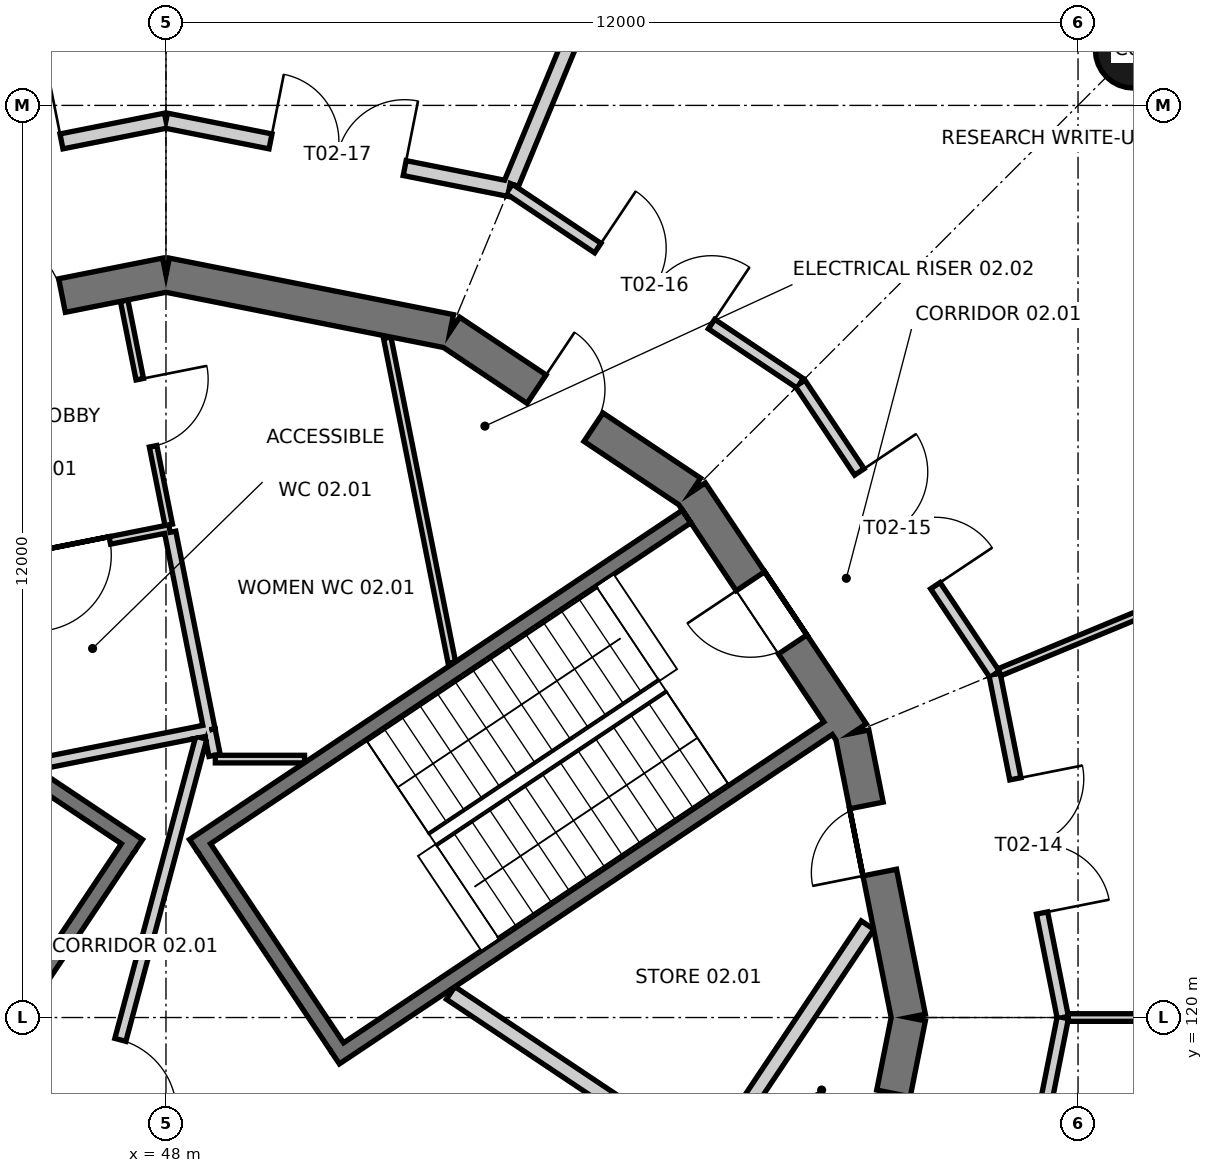
"""IFC4 building model, lengths in metres.
Left out: names, types, materials, properties, quantities, classifications, styles, units other than length and angle.
Written with IfcOpenShell. Run it as: python <this file> out.ifc"""

import sys

from ifc_helpers import new_model, si_unit, direction, frame, frame_2d, origin, origin_2d, place, context, subcontext, project, spatial, polyline, rectangle, circle, outline, extrude, element, fill, save


model = new_model("IFC4")
c1 = context("Model", 3, precision=1e-05, world=origin(), true_north=direction((0.0, 1.0)))
c2 = subcontext(c1, "Body", "Model", "MODEL_VIEW")
j1 = project(units=[si_unit("LENGTHUNIT", "METRE"), si_unit("PLANEANGLEUNIT", "RADIAN")], contexts=[c1])
p1 = place(None, origin())
s1 = spatial("IfcSite", under=j1, at=p1, CompositionType="ELEMENT")
p2 = place(p1, origin())
s2 = spatial("IfcBuilding", under=s1, at=p2, CompositionType="ELEMENT")
p3 = place(p2, frame((0.0, 0.0, 10.8)))
s3 = spatial("IfcBuildingStorey", under=s2, at=p3, CompositionType="ELEMENT", Elevation=10.8)
p4 = place(p3, frame((57.771, 120.0, 0.0), z_axis=(0.0, 0.0, 1.0), x_axis=(-0.195069197673, 0.98078948206, 0.0)))
e1 = element("IfcWall", 1, at=p4, inside=s3, PredefinedType="SHEAR", context=c2, shape_type="SweptSolid", body=[
    extrude(outline(polyline([(-0.045, -0.225), (3.857, -0.225), (3.768, 0.225), (0.045, 0.225), (-0.045, -0.225)])), origin(), (0.0, 0.0, 1.0), 4.8),
])
p5 = place(p4, frame((1.945, 0.0, 0.0)))
e2 = element("IfcOpeningElement", 2, at=p5, cuts=e1, PredefinedType="OPENING", context=c2, shape_type="SweptSolid", body=[
    extrude(rectangle(XDim=0.9, YDim=2.1, at=frame_2d((0.45, 1.05))), frame((0.0, 0.235, 0.0), z_axis=(0.0, -1.0, 0.0), x_axis=(1.0, 0.0, 0.0)), (0.0, 0.0, 1.0), 0.47),
])
p6 = place(p3, frame((57.027, 123.739, 0.0), z_axis=(0.0, 0.0, 1.0), x_axis=(-0.555542277102, 0.83148829117, 0.0)))
e3 = element("IfcWall", 3, at=p6, inside=s3, PredefinedType="SHEAR", context=c2, shape_type="SweptSolid", body=[
    extrude(outline(polyline([(-0.045, -0.225), (3.857, -0.225), (3.768, 0.225), (0.045, 0.225), (-0.045, -0.225)])), origin(), (0.0, 0.0, 1.0), 4.8),
])
p7 = place(p6, frame((1.406, 0.0, 0.0)))
e4 = element("IfcOpeningElement", 4, at=p7, cuts=e3, PredefinedType="OPENING", context=c2, shape_type="SweptSolid", body=[
    extrude(rectangle(XDim=1.0, YDim=2.1, at=frame_2d((0.5, 1.05))), frame((0.0, 0.235, 0.0), z_axis=(0.0, -1.0, 0.0), x_axis=(1.0, 0.0, 0.0)), (0.0, 0.0, 1.0), 0.47),
])
p8 = place(p3, frame((54.909, 126.909, 0.0), z_axis=(0.0, 0.0, 1.0), x_axis=(-0.83148829117, 0.555542277102, 0.0)))
e5 = element("IfcWall", 5, at=p8, inside=s3, PredefinedType="SHEAR", context=c2, shape_type="SweptSolid", body=[
    extrude(outline(polyline([(-0.045, -0.225), (3.857, -0.225), (3.768, 0.225), (0.045, 0.225), (-0.045, -0.225)])), origin(), (0.0, 0.0, 1.0), 4.8),
])
p9 = place(p8, frame((1.545, 0.0, 0.0)))
e6 = element("IfcOpeningElement", 6, at=p9, cuts=e5, PredefinedType="OPENING", context=c2, shape_type="SweptSolid", body=[
    extrude(rectangle(XDim=0.9, YDim=2.1, at=frame_2d((0.45, 1.05))), frame((0.0, 0.235, 0.0), z_axis=(0.0, -1.0, 0.0), x_axis=(1.0, 0.0, 0.0)), (0.0, 0.0, 1.0), 0.47),
])
p10 = place(p3, frame((51.739, 129.027, 0.0), z_axis=(0.0, 0.0, 1.0), x_axis=(-0.98078948206, 0.195069197673, 0.0)))
e7 = element("IfcWall", 7, at=p10, inside=s3, PredefinedType="SHEAR", context=c2, shape_type="SweptSolid", body=[
    extrude(outline(polyline([(-0.045, -0.225), (3.857, -0.225), (3.768, 0.225), (0.045, 0.225), (-0.045, -0.225)])), origin(), (0.0, 0.0, 1.0), 4.8),
])
p11 = place(p3, frame((48.0, 129.771, 0.0), z_axis=(0.0, 0.0, 1.0), x_axis=(-0.98078948206, -0.195069197673, 0.0)))
e8 = element("IfcWall", 8, at=p11, inside=s3, PredefinedType="SHEAR", context=c2, shape_type="SweptSolid", body=[
    extrude(outline(polyline([(-0.045, -0.225), (3.857, -0.225), (3.768, 0.225), (0.045, 0.225), (-0.045, -0.225)])), origin(), (0.0, 0.0, 1.0), 4.8),
])
p12 = place(p11, frame((1.395, 0.0, 0.0)))
e9 = element("IfcOpeningElement", 9, at=p12, cuts=e8, PredefinedType="OPENING", context=c2, shape_type="SweptSolid", body=[
    extrude(rectangle(XDim=1.0, YDim=2.1, at=frame_2d((0.5, 1.05))), frame((0.0, 0.235, 0.0), z_axis=(0.0, -1.0, 0.0), x_axis=(1.0, 0.0, 0.0)), (0.0, 0.0, 1.0), 0.47),
])
p13 = place(p3, frame((57.027, 116.261, 0.0), z_axis=(0.0, 0.0, 1.0), x_axis=(0.195069197673, 0.98078948206, 0.0)))
e10 = element("IfcWall", 10, at=p13, inside=s3, PredefinedType="SHEAR", context=c2, shape_type="SweptSolid", body=[
    extrude(outline(polyline([(-0.045, -0.225), (3.857, -0.225), (3.768, 0.225), (0.045, 0.225), (-0.045, -0.225)])), origin(), (0.0, 0.0, 1.0), 4.8),
])
p14 = place(p13, frame((1.895, 0.0, 0.0)))
e11 = element("IfcOpeningElement", 11, at=p14, cuts=e10, PredefinedType="OPENING", context=c2, shape_type="SweptSolid", body=[
    extrude(rectangle(XDim=0.9, YDim=2.1, at=frame_2d((0.45, 1.05))), frame((0.0, 0.235, 0.0), z_axis=(0.0, -1.0, 0.0), x_axis=(1.0, 0.0, 0.0)), (0.0, 0.0, 1.0), 0.47),
])
p15 = place(p3, frame((48.365, 122.258, 0.0), z_axis=(0.0, 0.0, 1.0), x_axis=(0.831476803301, 0.555559470779, 0.0)))
e12 = element("IfcWall", 12, at=p15, inside=s3, PredefinedType="SHEAR", context=c2, shape_type="SweptSolid", body=[
    extrude(rectangle(XDim=7.8, YDim=0.2, at=frame_2d((3.9, 0.0))), origin(), (0.0, 0.0, 1.0), 4.8),
])
p16 = place(p3, frame((50.226, 119.473, 0.0), z_axis=(0.0, 0.0, 1.0), x_axis=(0.831486463828, 0.555545012102, 0.0)))
e13 = element("IfcWall", 13, at=p16, inside=s3, PredefinedType="SHEAR", context=c2, shape_type="SweptSolid", body=[
    extrude(rectangle(XDim=7.8, YDim=0.2, at=frame_2d((3.9, 0.0))), origin(), (0.0, 0.0, 1.0), 4.8),
])
p17 = place(p3, frame((50.253, 119.612, 0.0), z_axis=(0.0, 0.0, 1.0), x_axis=(-0.55555842186, 0.831477504146, 0.0)))
e14 = element("IfcWall", 14, at=p17, inside=s3, PredefinedType="SHEAR", context=c2, shape_type="SweptSolid", body=[
    extrude(rectangle(XDim=3.15, YDim=0.2, at=frame_2d((1.575, 0.0))), origin(), (0.0, 0.0, 1.0), 4.8),
])
p18 = place(p3, frame((47.635, 122.258, 0.0), z_axis=(0.0, 0.0, 1.0), x_axis=(-0.831476803301, 0.555559470779, 0.0)))
e15 = element("IfcWall", 15, at=p18, inside=s3, PredefinedType="SHEAR", context=c2, shape_type="SweptSolid", body=[
    extrude(rectangle(XDim=7.8, YDim=0.2, at=frame_2d((3.9, 0.0))), origin(), (0.0, 0.0, 1.0), 4.8),
])
p19 = place(p3, frame((47.497, 122.231, 0.0), z_axis=(0.0, 0.0, 1.0), x_axis=(-0.55555842186, -0.831477504146, 0.0)))
e16 = element("IfcWall", 16, at=p19, inside=s3, PredefinedType="SHEAR", context=c2, shape_type="SweptSolid", body=[
    extrude(rectangle(XDim=3.15, YDim=0.2, at=frame_2d((1.575, 0.0))), origin(), (0.0, 0.0, 1.0), 4.8),
])
p20 = place(p3, frame((60.728, 132.728, 0.0), z_axis=(0.0, 0.0, 1.0), x_axis=(1.0, 0.0, 0.0)))
e17 = element("IfcColumn", 17, at=p20, inside=s3, PredefinedType="COLUMN", context=c2, shape_type="SweptSolid", body=[
    extrude(circle(Radius=0.5, at=origin_2d()), origin(), (0.0, 0.0, 1.0), 4.8),
])
p21 = place(p3, frame((55.126, 118.065, 0.0), z_axis=(0.0, 0.0, 1.0), x_axis=(-0.831495502265, 0.555531483998, 0.0)))
e18 = element("IfcWall", 18, at=p21, inside=s3, PredefinedType="SOLIDWALL", context=c2, shape_type="SweptSolid", body=[
    extrude(rectangle(XDim=4.065, YDim=0.2, at=frame_2d((2.033, 0.0))), origin(), (0.0, 0.0, 1.0), 4.52),
])
p22 = place(p3, frame((57.231, 121.215, 0.0), z_axis=(0.0, 0.0, 1.0), x_axis=(-0.555600969312, -0.831449074147, 0.0)))
e19 = element("IfcWall", 19, at=p22, inside=s3, PredefinedType="SOLIDWALL", context=c2, shape_type="SweptSolid", body=[
    extrude(rectangle(XDim=3.689, YDim=0.2, at=frame_2d((1.844, 0.0))), origin(), (0.0, 0.0, 1.0), 4.52),
])
p23 = place(p3, frame((48.046, 126.433, 0.0), z_axis=(0.0, 0.0, 1.0), x_axis=(-0.980778805994, -0.195122868248, 0.0)))
e20 = element("IfcWall", 20, at=p23, inside=s3, PredefinedType="PARTITIONING", context=c2, shape_type="SweptSolid", body=[
    extrude(rectangle(XDim=2.6, YDim=0.1, at=frame_2d((1.3, 0.0))), origin(), (0.0, 0.0, 1.0), 4.52),
])
p24 = place(p23, frame((0.8, 0.0, 0.0)))
e21 = element("IfcOpeningElement", 21, at=p24, cuts=e20, PredefinedType="OPENING", context=c2, shape_type="SweptSolid", body=[
    extrude(rectangle(XDim=1.0, YDim=2.1, at=frame_2d((0.5, 1.05))), frame((0.0, 0.06, 0.0), z_axis=(0.0, -1.0, 0.0), x_axis=(1.0, 0.0, 0.0)), (0.0, 0.0, 1.0), 0.12),
])
p25 = place(p3, frame((47.449, 129.432, 0.0), z_axis=(0.0, 0.0, 1.0), x_axis=(0.195054549846, -0.980792395252, 0.0)))
e22 = element("IfcWall", 22, at=p25, inside=s3, PredefinedType="PARTITIONING", context=c2, shape_type="SweptSolid", body=[
    extrude(rectangle(XDim=3.008, YDim=0.1, at=frame_2d((1.504, 0.0))), origin(), (0.0, 0.0, 1.0), 4.52),
])
p26 = place(p25, frame((1.054, 0.0, 0.0)))
e23 = element("IfcOpeningElement", 23, at=p26, cuts=e22, PredefinedType="OPENING", context=c2, shape_type="SweptSolid", body=[
    extrude(rectangle(XDim=0.9, YDim=2.1, at=frame_2d((0.45, 1.05))), frame((0.0, 0.06, 0.0), z_axis=(0.0, -1.0, 0.0), x_axis=(1.0, 0.0, 0.0)), (0.0, 0.0, 1.0), 0.12),
])
p27 = place(p3, frame((48.056, 126.384, 0.0), z_axis=(0.0, 0.0, 1.0), x_axis=(0.195123903338, -0.980778600065, 0.0)))
e24 = element("IfcWall", 24, at=p27, inside=s3, PredefinedType="PARTITIONING", context=c2, shape_type="SweptSolid", body=[
    extrude(rectangle(XDim=2.65, YDim=0.15, at=frame_2d((1.325, 0.0))), origin(), (0.0, 0.0, 1.0), 4.52),
])
p28 = place(p3, frame((48.524, 123.775, 0.0), z_axis=(0.0, 0.0, 1.0), x_axis=(-0.980777249161, -0.195130693455, 0.0)))
e25 = element("IfcWall", 25, at=p28, inside=s3, PredefinedType="PARTITIONING", context=c2, shape_type="SweptSolid", body=[
    extrude(rectangle(XDim=2.287, YDim=0.15, at=frame_2d((1.144, 0.0))), origin(), (0.0, 0.0, 1.0), 4.52),
])
p29 = place(p3, frame((50.911, 128.943, 0.0), z_axis=(0.0, 0.0, 1.0), x_axis=(0.195113868301, -0.980780596462, 0.0)))
e26 = element("IfcWall", 26, at=p29, inside=s3, PredefinedType="PARTITIONING", context=c2, shape_type="SweptSolid", body=[
    extrude(rectangle(XDim=4.357, YDim=0.1, at=frame_2d((2.178, 0.0))), origin(), (0.0, 0.0, 1.0), 4.52),
])
p30 = place(p3, frame((49.823, 123.4, 0.0), z_axis=(0.0, 0.0, 1.0), x_axis=(-1.0, 0.0, 0.0)))
e27 = element("IfcWall", 27, at=p30, inside=s3, PredefinedType="PARTITIONING", context=c2, shape_type="SweptSolid", body=[
    extrude(rectangle(XDim=1.174, YDim=0.1, at=frame_2d((0.587, 0.0))), origin(), (0.0, 0.0, 1.0), 4.52),
])
p31 = place(p3, frame((48.639, 123.449, 0.0), z_axis=(0.0, 0.0, 1.0), x_axis=(-0.194880473507, 0.98082699853, 0.0)))
e28 = element("IfcWall", 28, at=p31, inside=s3, PredefinedType="PARTITIONING", context=c2, shape_type="SweptSolid", body=[
    extrude(rectangle(XDim=0.342, YDim=0.15, at=frame_2d((0.171, 0.0))), origin(), (0.0, 0.0, 1.0), 4.52),
])
p32 = place(p3, frame((47.102, 118.595, 0.0), z_axis=(0.0, 0.0, 1.0), x_axis=(0.258814124304, 0.9659271448, 0.0)))
e29 = element("IfcWall", 29, at=p32, inside=s3, PredefinedType="PARTITIONING", context=c2, shape_type="SweptSolid", body=[
    extrude(rectangle(XDim=5.265, YDim=0.15, at=frame_2d((2.632, 0.0))), origin(), (0.0, 0.0, 1.0), 4.52),
])
p33 = place(p32, frame((0.15, 0.0, 0.0)))
e30 = element("IfcOpeningElement", 30, at=p33, cuts=e29, PredefinedType="OPENING", context=c2, shape_type="SweptSolid", body=[
    extrude(rectangle(XDim=1.0, YDim=2.1, at=frame_2d((0.5, 1.05))), frame((0.0, 0.085, 0.0), z_axis=(0.0, -1.0, 0.0), x_axis=(1.0, 0.0, 0.0)), (0.0, 0.0, 1.0), 0.17),
])
p34 = place(p3, frame((58.902, 124.516, 0.0), z_axis=(0.0, 0.0, 1.0), x_axis=(0.19508608079, -0.980786124026, 0.0)))
e31 = element("IfcWall", 31, at=p34, inside=s3, PredefinedType="PARTITIONING", context=c2, shape_type="SweptSolid", body=[
    extrude(rectangle(XDim=4.604, YDim=0.15, at=frame_2d((2.302, 0.0))), origin(), (0.0, 0.0, 1.0), 4.52),
])
p35 = place(p34, frame((1.402, 0.0, 0.0)))
e32 = element("IfcOpeningElement", 32, at=p35, cuts=e31, PredefinedType="OPENING", context=c2, shape_type="SweptSolid", body=[
    extrude(rectangle(XDim=1.8, YDim=2.1, at=frame_2d((0.9, 1.05))), frame((0.0, 0.085, 0.0), z_axis=(0.0, -1.0, 0.0), x_axis=(1.0, 0.0, 0.0)), (0.0, 0.0, 1.0), 0.17),
])
p36 = place(p3, frame((52.516, 130.902, 0.0), z_axis=(0.0, 0.0, 1.0), x_axis=(0.831486983854, -0.555544233776, 0.0)))
e33 = element("IfcWall", 33, at=p36, inside=s3, PredefinedType="PARTITIONING", context=c2, shape_type="SweptSolid", body=[
    extrude(rectangle(XDim=4.604, YDim=0.15, at=frame_2d((2.302, 0.0))), origin(), (0.0, 0.0, 1.0), 4.52),
])
p37 = place(p36, frame((1.402, 0.0, 0.0)))
e34 = element("IfcOpeningElement", 34, at=p37, cuts=e33, PredefinedType="OPENING", context=c2, shape_type="SweptSolid", body=[
    extrude(rectangle(XDim=1.8, YDim=2.1, at=frame_2d((0.9, 1.05))), frame((0.0, 0.085, 0.0), z_axis=(0.0, -1.0, 0.0), x_axis=(1.0, 0.0, 0.0)), (0.0, 0.0, 1.0), 0.17),
])
p38 = place(p3, frame((56.344, 128.344, 0.0), z_axis=(0.0, 0.0, 1.0), x_axis=(0.555544233776, -0.831486983854, 0.0)))
e35 = element("IfcWall", 35, at=p38, inside=s3, PredefinedType="PARTITIONING", context=c2, shape_type="SweptSolid", body=[
    extrude(rectangle(XDim=4.604, YDim=0.15, at=frame_2d((2.302, 0.0))), origin(), (0.0, 0.0, 1.0), 4.52),
])
p39 = place(p38, frame((1.402, 0.0, 0.0)))
e36 = element("IfcOpeningElement", 36, at=p39, cuts=e35, PredefinedType="OPENING", context=c2, shape_type="SweptSolid", body=[
    extrude(rectangle(XDim=1.8, YDim=2.1, at=frame_2d((0.9, 1.05))), frame((0.0, 0.085, 0.0), z_axis=(0.0, -1.0, 0.0), x_axis=(1.0, 0.0, 0.0)), (0.0, 0.0, 1.0), 0.17),
])
p40 = place(p3, frame((48.0, 131.8, 0.0), z_axis=(0.0, 0.0, 1.0), x_axis=(0.980786124026, -0.19508608079, 0.0)))
e37 = element("IfcWall", 37, at=p40, inside=s3, PredefinedType="SOLIDWALL", context=c2, shape_type="SweptSolid", body=[
    extrude(rectangle(XDim=4.604, YDim=0.2, at=frame_2d((2.302, 0.0))), origin(), (0.0, 0.0, 1.0), 4.52),
])
p41 = place(p40, frame((1.402, 0.0, 0.0)))
e38 = element("IfcOpeningElement", 38, at=p41, cuts=e37, PredefinedType="OPENING", context=c2, shape_type="SweptSolid", body=[
    extrude(rectangle(XDim=1.8, YDim=2.1, at=frame_2d((0.9, 1.05))), frame((0.0, 0.11, 0.0), z_axis=(0.0, -1.0, 0.0), x_axis=(1.0, 0.0, 0.0)), (0.0, 0.0, 1.0), 0.22),
])
p42 = place(p3, frame((43.484, 130.902, 0.0), z_axis=(0.0, 0.0, 1.0), x_axis=(0.980786124026, 0.19508608079, 0.0)))
e39 = element("IfcWall", 39, at=p42, inside=s3, PredefinedType="SOLIDWALL", context=c2, shape_type="SweptSolid", body=[
    extrude(rectangle(XDim=4.604, YDim=0.2, at=frame_2d((2.302, 0.0))), origin(), (0.0, 0.0, 1.0), 4.52),
])
p43 = place(p42, frame((1.402, 0.0, 0.0)))
e40 = element("IfcOpeningElement", 40, at=p43, cuts=e39, PredefinedType="OPENING", context=c2, shape_type="SweptSolid", body=[
    extrude(rectangle(XDim=1.8, YDim=2.1, at=frame_2d((0.9, 1.05))), frame((0.0, 0.11, 0.0), z_axis=(0.0, -1.0, 0.0), x_axis=(1.0, 0.0, 0.0)), (0.0, 0.0, 1.0), 0.22),
])
p44 = place(p3, frame((59.8, 120.0, 0.0), z_axis=(0.0, 0.0, 1.0), x_axis=(-0.19508608079, -0.980786124026, 0.0)))
e41 = element("IfcWall", 41, at=p44, inside=s3, PredefinedType="PARTITIONING", context=c2, shape_type="SweptSolid", body=[
    extrude(rectangle(XDim=4.604, YDim=0.15, at=frame_2d((2.302, 0.0))), origin(), (0.0, 0.0, 1.0), 4.52),
])
p45 = place(p44, frame((1.402, 0.0, 0.0)))
e42 = element("IfcOpeningElement", 42, at=p45, cuts=e41, PredefinedType="OPENING", context=c2, shape_type="SweptSolid", body=[
    extrude(rectangle(XDim=1.8, YDim=2.1, at=frame_2d((0.9, 1.05))), frame((0.0, 0.085, 0.0), z_axis=(0.0, -1.0, 0.0), x_axis=(1.0, 0.0, 0.0)), (0.0, 0.0, 1.0), 0.17),
])
p46 = place(p3, frame((59.872, 120.0, 0.0), z_axis=(0.0, 0.0, 1.0), x_axis=(1.0, 0.0, 0.0)))
e43 = element("IfcWall", 43, at=p46, inside=s3, PredefinedType="PARTITIONING", context=c2, shape_type="SweptSolid", body=[
    extrude(rectangle(XDim=5.128, YDim=0.1, at=frame_2d((2.564, 0.0))), origin(), (0.0, 0.0, 1.0), 3.72),
])
p47 = place(p3, frame((58.968, 124.543, 0.0), z_axis=(0.0, 0.0, 1.0), x_axis=(0.923887017883, 0.38266536058, 0.0)))
e44 = element("IfcWall", 44, at=p47, inside=s3, PredefinedType="PARTITIONING", context=c2, shape_type="SweptSolid", body=[
    extrude(rectangle(XDim=5.639, YDim=0.1, at=frame_2d((2.819, 0.0))), origin(), (0.0, 0.0, 1.0), 3.72),
])
p48 = place(p3, frame((52.543, 130.968, 0.0), z_axis=(0.0, 0.0, 1.0), x_axis=(0.38266536058, 0.923887017883, 0.0)))
e45 = element("IfcWall", 45, at=p48, inside=s3, PredefinedType="SOLIDWALL", context=c2, shape_type="SweptSolid", body=[
    extrude(rectangle(XDim=5.639, YDim=0.2, at=frame_2d((2.819, 0.0))), origin(), (0.0, 0.0, 1.0), 3.72),
])
p49 = place(p7, origin())
e46 = element("IfcDoor", 46, at=p49, inside=s3, OperationType="SINGLE_SWING_RIGHT", PredefinedType="DOOR", context=c2, shape_type="SweptSolid", body=[
    extrude(rectangle(XDim=1.0, YDim=2.1, at=frame_2d((0.5, 1.05))), frame((0.0, 0.025, 0.0), z_axis=(0.0, -1.0, 0.0), x_axis=(1.0, 0.0, 0.0)), (0.0, 0.0, 1.0), 0.05),
])
fill(e4, e46)
p50 = place(p5, origin())
e47 = element("IfcDoor", 47, at=p50, inside=s3, OperationType="SINGLE_SWING_LEFT", PredefinedType="DOOR", context=c2, shape_type="SweptSolid", body=[
    extrude(rectangle(XDim=0.9, YDim=2.1, at=frame_2d((0.45, 1.05))), frame((0.0, 0.025, 0.0), z_axis=(0.0, -1.0, 0.0), x_axis=(1.0, 0.0, 0.0)), (0.0, 0.0, 1.0), 0.05),
])
fill(e2, e47)
p51 = place(p14, frame((0.9, 0.0, 0.0), z_axis=(0.0, 0.0, 1.0), x_axis=(-1.0, 0.0, 0.0)))
e48 = element("IfcDoor", 48, at=p51, inside=s3, OperationType="SINGLE_SWING_RIGHT", PredefinedType="DOOR", context=c2, shape_type="SweptSolid", body=[
    extrude(rectangle(XDim=0.9, YDim=2.1, at=frame_2d((0.45, 1.05))), frame((0.0, 0.025, 0.0), z_axis=(0.0, -1.0, 0.0), x_axis=(1.0, 0.0, 0.0)), (0.0, 0.0, 1.0), 0.05),
])
fill(e11, e48)
p52 = place(p12, frame((1.0, 0.0, 0.0), z_axis=(0.0, 0.0, 1.0), x_axis=(-1.0, 0.0, 0.0)))
e49 = element("IfcDoor", 49, at=p52, inside=s3, OperationType="SINGLE_SWING_LEFT", PredefinedType="DOOR", context=c2, shape_type="SweptSolid", body=[
    extrude(rectangle(XDim=1.0, YDim=2.1, at=frame_2d((0.5, 1.05))), frame((0.0, 0.025, 0.0), z_axis=(0.0, -1.0, 0.0), x_axis=(1.0, 0.0, 0.0)), (0.0, 0.0, 1.0), 0.05),
])
fill(e9, e49)
p53 = place(p9, frame((0.9, 0.0, 0.0), z_axis=(0.0, 0.0, 1.0), x_axis=(-1.0, 0.0, 0.0)))
e50 = element("IfcDoor", 50, at=p53, inside=s3, OperationType="SINGLE_SWING_LEFT", PredefinedType="DOOR", context=c2, shape_type="SweptSolid", body=[
    extrude(rectangle(XDim=0.9, YDim=2.1, at=frame_2d((0.45, 1.05))), frame((0.0, 0.025, 0.0), z_axis=(0.0, -1.0, 0.0), x_axis=(1.0, 0.0, 0.0)), (0.0, 0.0, 1.0), 0.05),
])
fill(e6, e50)
p54 = place(p24, origin())
e51 = element("IfcDoor", 51, at=p54, inside=s3, OperationType="SINGLE_SWING_RIGHT", PredefinedType="DOOR", context=c2, shape_type="SweptSolid", body=[
    extrude(rectangle(XDim=1.0, YDim=2.1, at=frame_2d((0.5, 1.05))), frame((0.0, 0.025, 0.0), z_axis=(0.0, -1.0, 0.0), x_axis=(1.0, 0.0, 0.0)), (0.0, 0.0, 1.0), 0.05),
])
fill(e21, e51)
p55 = place(p26, origin())
e52 = element("IfcDoor", 52, at=p55, inside=s3, OperationType="SINGLE_SWING_LEFT", PredefinedType="DOOR", context=c2, shape_type="SweptSolid", body=[
    extrude(rectangle(XDim=0.9, YDim=2.1, at=frame_2d((0.45, 1.05))), frame((0.0, 0.025, 0.0), z_axis=(0.0, -1.0, 0.0), x_axis=(1.0, 0.0, 0.0)), (0.0, 0.0, 1.0), 0.05),
])
fill(e23, e52)
p56 = place(p33, frame((1.0, 0.0, 0.0), z_axis=(0.0, 0.0, 1.0), x_axis=(-1.0, 0.0, 0.0)))
e53 = element("IfcDoor", 53, at=p56, inside=s3, OperationType="SINGLE_SWING_RIGHT", PredefinedType="DOOR", context=c2, shape_type="SweptSolid", body=[
    extrude(rectangle(XDim=1.0, YDim=2.1, at=frame_2d((0.5, 1.05))), frame((0.0, 0.025, 0.0), z_axis=(0.0, -1.0, 0.0), x_axis=(1.0, 0.0, 0.0)), (0.0, 0.0, 1.0), 0.05),
])
fill(e30, e53)
p57 = place(p35, origin())
e54 = element("IfcDoor", 54, at=p57, inside=s3, OperationType="DOUBLE_DOOR_SINGLE_SWING", PredefinedType="DOOR", context=c2, shape_type="SweptSolid", body=[
    extrude(rectangle(XDim=1.8, YDim=2.1, at=frame_2d((0.9, 1.05))), frame((0.0, 0.025, 0.0), z_axis=(0.0, -1.0, 0.0), x_axis=(1.0, 0.0, 0.0)), (0.0, 0.0, 1.0), 0.05),
])
fill(e32, e54)
p58 = place(p39, origin())
e55 = element("IfcDoor", 55, at=p58, inside=s3, OperationType="DOUBLE_DOOR_SINGLE_SWING", PredefinedType="DOOR", context=c2, shape_type="SweptSolid", body=[
    extrude(rectangle(XDim=1.8, YDim=2.1, at=frame_2d((0.9, 1.05))), frame((0.0, 0.025, 0.0), z_axis=(0.0, -1.0, 0.0), x_axis=(1.0, 0.0, 0.0)), (0.0, 0.0, 1.0), 0.05),
])
fill(e36, e55)
p59 = place(p37, origin())
e56 = element("IfcDoor", 56, at=p59, inside=s3, OperationType="DOUBLE_DOOR_SINGLE_SWING", PredefinedType="DOOR", context=c2, shape_type="SweptSolid", body=[
    extrude(rectangle(XDim=1.8, YDim=2.1, at=frame_2d((0.9, 1.05))), frame((0.0, 0.025, 0.0), z_axis=(0.0, -1.0, 0.0), x_axis=(1.0, 0.0, 0.0)), (0.0, 0.0, 1.0), 0.05),
])
fill(e34, e56)
p60 = place(p41, origin())
e57 = element("IfcDoor", 57, at=p60, inside=s3, OperationType="DOUBLE_DOOR_SINGLE_SWING", PredefinedType="DOOR", context=c2, shape_type="SweptSolid", body=[
    extrude(rectangle(XDim=1.8, YDim=2.1, at=frame_2d((0.9, 1.05))), frame((0.0, 0.025, 0.0), z_axis=(0.0, -1.0, 0.0), x_axis=(1.0, 0.0, 0.0)), (0.0, 0.0, 1.0), 0.05),
])
fill(e38, e57)
p61 = place(p43, origin())
e58 = element("IfcDoor", 58, at=p61, inside=s3, OperationType="DOUBLE_DOOR_SINGLE_SWING", PredefinedType="DOOR", context=c2, shape_type="SweptSolid", body=[
    extrude(rectangle(XDim=1.8, YDim=2.1, at=frame_2d((0.9, 1.05))), frame((0.0, 0.025, 0.0), z_axis=(0.0, -1.0, 0.0), x_axis=(1.0, 0.0, 0.0)), (0.0, 0.0, 1.0), 0.05),
])
fill(e40, e58)
save(model, sys.argv[1])
